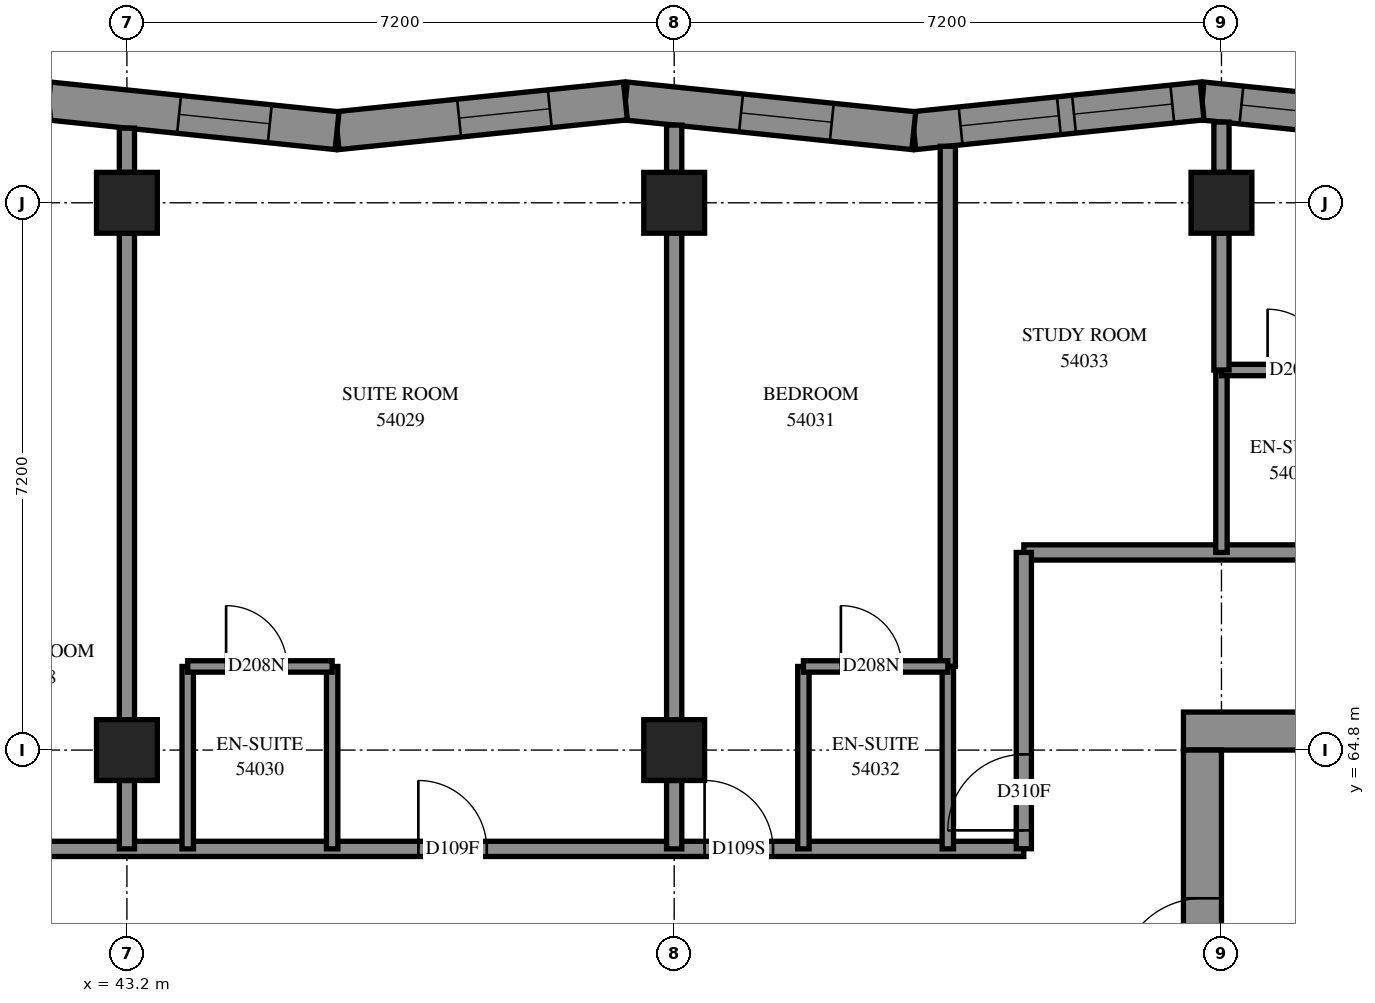
"""IFC4 building model, lengths in metres.
Left out: names, types, materials, properties, quantities, classifications, styles, units other than length and angle.
Written with IfcOpenShell. Run it as: python <this file> out.ifc"""

import sys

from ifc_helpers import new_model, si_unit, direction, frame, frame_2d, origin, origin_2d, place, context, subcontext, project, spatial, polyline, rectangle, outline, extrude, element, fill, save


model = new_model("IFC4")
c1 = context("Model", 3, precision=1e-05, world=origin(), true_north=direction((0.0, 1.0)))
c2 = subcontext(c1, "Body", "Model", "MODEL_VIEW")
j1 = project(units=[si_unit("LENGTHUNIT", "METRE"), si_unit("PLANEANGLEUNIT", "RADIAN")], contexts=[c1])
p1 = place(None, origin())
s1 = spatial("IfcSite", under=j1, at=p1, CompositionType="ELEMENT")
p2 = place(p1, origin())
s2 = spatial("IfcBuilding", under=s1, at=p2, CompositionType="ELEMENT")
p3 = place(p2, frame((0.0, 0.0, 199.8)))
s3 = spatial("IfcBuildingStorey", under=s2, at=p3, CompositionType="ELEMENT", Elevation=199.8)
for number, where, z_axis, x_axis in (
    (1, (43.2, 64.8, 0.0), (0.0, 0.0, 1.0), (1.0, 0.0, 0.0)),
    (2, (43.2, 72.0, 0.0), (0.0, 0.0, 1.0), (1.0, 0.0, 0.0)),
    (3, (50.4, 64.8, 0.0), (0.0, 0.0, 1.0), (1.0, 0.0, 0.0)),
    (4, (50.4, 72.0, 0.0), (0.0, 0.0, 1.0), (1.0, 0.0, 0.0)),
    (5, (57.6, 72.0, 0.0), (0.0, 0.0, 1.0), (1.0, 0.0, 0.0)),
):
    element("IfcColumn", number, at=place(p3, frame(where, z_axis=z_axis, x_axis=x_axis)), inside=s3, PredefinedType="COLUMN", context=c2, shape_type="SweptSolid", body=[
        extrude(rectangle(XDim=0.8, YDim=0.8, at=origin_2d()), origin(), (0.0, 0.0, 1.0), 3.1),
    ])
p4 = place(p3, frame((57.1, 65.05, -0.3), z_axis=(0.0, 0.0, 1.0), x_axis=(1.0, 0.0, 0.0)))
e6 = element("IfcWall", 6, at=p4, inside=s3, PredefinedType="SHEAR", context=c2, shape_type="SweptSolid", body=[
    extrude(rectangle(XDim=15.4, YDim=0.5, at=frame_2d((7.7, 0.0))), origin(), (0.0, 0.0, 1.0), 2.7),
])
p5 = place(p4, frame((10.5, 0.0, 0.3)))
e7 = element("IfcOpeningElement", 7, at=p5, cuts=e6, PredefinedType="OPENING", context=c2, shape_type="SweptSolid", body=[
    extrude(rectangle(XDim=0.8, YDim=2.1, at=frame_2d((0.4, 1.05))), frame((0.0, 0.26, 0.0), z_axis=(0.0, -1.0, 0.0), x_axis=(1.0, 0.0, 0.0)), (0.0, 0.0, 1.0), 0.52),
])
p6 = place(p3, frame((57.35, 50.4, -0.3), z_axis=(0.0, 0.0, 1.0), x_axis=(0.0, 1.0, 0.0)))
e8 = element("IfcWall", 8, at=p6, inside=s3, PredefinedType="SHEAR", context=c2, shape_type="SweptSolid", body=[
    extrude(rectangle(XDim=14.4, YDim=0.5, at=frame_2d((7.2, 0.0))), origin(), (0.0, 0.0, 1.0), 2.7),
])
p7 = place(p6, frame((4.55, 0.0, 0.3)))
e9 = element("IfcOpeningElement", 9, at=p7, cuts=e8, PredefinedType="OPENING", context=c2, shape_type="SweptSolid", body=[
    extrude(rectangle(XDim=1.1, YDim=2.1, at=frame_2d((0.55, 1.05))), frame((0.0, 0.26, 0.0), z_axis=(0.0, -1.0, 0.0), x_axis=(1.0, 0.0, 0.0)), (0.0, 0.0, 1.0), 0.52),
])
p8 = place(p6, frame((11.35, 0.0, 0.3)))
e10 = element("IfcOpeningElement", 10, at=p8, cuts=e8, PredefinedType="OPENING", context=c2, shape_type="SweptSolid", body=[
    extrude(rectangle(XDim=1.1, YDim=2.1, at=frame_2d((0.55, 1.05))), frame((0.0, 0.26, 0.0), z_axis=(0.0, -1.0, 0.0), x_axis=(1.0, 0.0, 0.0)), (0.0, 0.0, 1.0), 0.52),
])
p9 = place(p3, frame((61.139, 72.949, 0.0), z_axis=(0.0, 0.0, 1.0), x_axis=(-0.9947306832, 0.1025225234, 0.0)))
e11 = element("IfcWall", 11, at=p9, inside=s3, PredefinedType="SOLIDWALL", context=c2, shape_type="SweptSolid", body=[
    extrude(outline(polyline([(0.026, -0.25), (3.84, -0.25), (3.788, 0.25), (-0.026, 0.25), (0.026, -0.25)])), origin(), (0.0, 0.0, 1.0), 3.1),
])
p10 = place(p9, frame((0.494, 0.0, 0.45)))
e12 = element("IfcOpeningElement", 12, at=p10, cuts=e11, PredefinedType="OPENING", context=c2, shape_type="SweptSolid", body=[
    extrude(rectangle(XDim=1.3, YDim=2.5, at=frame_2d((0.65, 1.25))), frame((0.0, 0.26, 0.0), z_axis=(0.0, -1.0, 0.0), x_axis=(1.0, 0.0, 0.0)), (0.0, 0.0, 1.0), 0.52),
])
p11 = place(p9, frame((1.994, 0.0, 0.45)))
e13 = element("IfcOpeningElement", 13, at=p11, cuts=e11, PredefinedType="OPENING", context=c2, shape_type="SweptSolid", body=[
    extrude(rectangle(XDim=1.3, YDim=2.5, at=frame_2d((0.65, 1.25))), frame((0.0, 0.26, 0.0), z_axis=(0.0, -1.0, 0.0), x_axis=(1.0, 0.0, 0.0)), (0.0, 0.0, 1.0), 0.52),
])
p12 = place(p3, frame((57.346, 73.34, 0.0), z_axis=(0.0, 0.0, 1.0), x_axis=(-0.9947304076, -0.1025251975, 0.0)))
e14 = element("IfcWall", 14, at=p12, inside=s3, PredefinedType="SOLIDWALL", context=c2, shape_type="SweptSolid", body=[
    extrude(outline(polyline([(-0.026, -0.25), (3.788, -0.25), (3.84, 0.25), (0.026, 0.25), (-0.026, -0.25)])), origin(), (0.0, 0.0, 1.0), 3.1),
])
p13 = place(p12, frame((0.395, 0.0, 0.45)))
e15 = element("IfcOpeningElement", 15, at=p13, cuts=e14, PredefinedType="OPENING", context=c2, shape_type="SweptSolid", body=[
    extrude(rectangle(XDim=1.3, YDim=2.5, at=frame_2d((0.65, 1.25))), frame((0.0, 0.26, 0.0), z_axis=(0.0, -1.0, 0.0), x_axis=(1.0, 0.0, 0.0)), (0.0, 0.0, 1.0), 0.52),
])
p14 = place(p12, frame((1.895, 0.0, 0.45)))
e16 = element("IfcOpeningElement", 16, at=p14, cuts=e14, PredefinedType="OPENING", context=c2, shape_type="SweptSolid", body=[
    extrude(rectangle(XDim=1.3, YDim=2.5, at=frame_2d((0.65, 1.25))), frame((0.0, 0.26, 0.0), z_axis=(0.0, -1.0, 0.0), x_axis=(1.0, 0.0, 0.0)), (0.0, 0.0, 1.0), 0.52),
])
p15 = place(p3, frame((53.552, 72.949, 0.0), z_axis=(0.0, 0.0, 1.0), x_axis=(-0.9947306832, 0.1025225234, 0.0)))
e17 = element("IfcWall", 17, at=p15, inside=s3, PredefinedType="SOLIDWALL", context=c2, shape_type="SweptSolid", body=[
    extrude(outline(polyline([(0.026, -0.25), (3.84, -0.25), (3.788, 0.25), (-0.026, 0.25), (0.026, -0.25)])), origin(), (0.0, 0.0, 1.0), 3.1),
])
p16 = place(p15, frame((1.084, 0.0, 0.45)))
e18 = element("IfcOpeningElement", 18, at=p16, cuts=e17, PredefinedType="OPENING", context=c2, shape_type="SweptSolid", body=[
    extrude(rectangle(XDim=1.2, YDim=2.5, at=frame_2d((0.6, 1.25))), frame((0.0, 0.26, 0.0), z_axis=(0.0, -1.0, 0.0), x_axis=(1.0, 0.0, 0.0)), (0.0, 0.0, 1.0), 0.52),
])
p17 = place(p3, frame((49.758, 73.34, 0.0), z_axis=(0.0, 0.0, 1.0), x_axis=(-0.9947306832, -0.1025225234, 0.0)))
e19 = element("IfcWall", 19, at=p17, inside=s3, PredefinedType="SOLIDWALL", context=c2, shape_type="SweptSolid", body=[
    extrude(outline(polyline([(-0.026, -0.25), (3.788, -0.25), (3.84, 0.25), (0.026, 0.25), (-0.026, -0.25)])), origin(), (0.0, 0.0, 1.0), 3.1),
])
p18 = place(p17, frame((1.0, 0.0, 0.45)))
e20 = element("IfcOpeningElement", 20, at=p18, cuts=e19, PredefinedType="OPENING", context=c2, shape_type="SweptSolid", body=[
    extrude(rectangle(XDim=1.2, YDim=2.5, at=frame_2d((0.6, 1.25))), frame((0.0, 0.26, 0.0), z_axis=(0.0, -1.0, 0.0), x_axis=(1.0, 0.0, 0.0)), (0.0, 0.0, 1.0), 0.52),
])
p19 = place(p3, frame((45.965, 72.949, 0.0), z_axis=(0.0, 0.0, 1.0), x_axis=(-0.9947304076, 0.1025251975, 0.0)))
e21 = element("IfcWall", 21, at=p19, inside=s3, PredefinedType="SOLIDWALL", context=c2, shape_type="SweptSolid", body=[
    extrude(outline(polyline([(0.026, -0.25), (3.84, -0.25), (3.788, 0.25), (-0.026, 0.25), (0.026, -0.25)])), origin(), (0.0, 0.0, 1.0), 3.1),
])
p20 = place(p19, frame((0.89, 0.0, 0.45)))
e22 = element("IfcOpeningElement", 22, at=p20, cuts=e21, PredefinedType="OPENING", context=c2, shape_type="SweptSolid", body=[
    extrude(rectangle(XDim=1.2, YDim=2.5, at=frame_2d((0.6, 1.25))), frame((0.0, 0.26, 0.0), z_axis=(0.0, -1.0, 0.0), x_axis=(1.0, 0.0, 0.0)), (0.0, 0.0, 1.0), 0.52),
])
p21 = place(p3, frame((55.0, 67.4, 0.0), z_axis=(0.0, 0.0, 1.0), x_axis=(1.0, 0.0, 0.0)))
e23 = element("IfcWall", 23, at=p21, inside=s3, PredefinedType="PARTITIONING", context=c2, shape_type="SweptSolid", body=[
    extrude(rectangle(XDim=19.6, YDim=0.2, at=frame_2d((9.8, 0.0))), origin(), (0.0, 0.0, 1.0), 3.1),
])
p22 = place(p21, frame((6.499, 0.0, 0.0)))
e24 = element("IfcOpeningElement", 24, at=p22, cuts=e23, PredefinedType="OPENING", context=c2, shape_type="SweptSolid", body=[
    extrude(rectangle(XDim=0.9, YDim=2.1, at=frame_2d((0.45, 1.05))), frame((0.0, 0.11, 0.0), z_axis=(0.0, -1.0, 0.0), x_axis=(1.0, 0.0, 0.0)), (0.0, 0.0, 1.0), 0.22),
])
p23 = place(p21, frame((14.001, 0.0, 0.0)))
e25 = element("IfcOpeningElement", 25, at=p23, cuts=e23, PredefinedType="OPENING", context=c2, shape_type="SweptSolid", body=[
    extrude(rectangle(XDim=0.9, YDim=2.1, at=frame_2d((0.45, 1.05))), frame((0.0, 0.11, 0.0), z_axis=(0.0, -1.0, 0.0), x_axis=(1.0, 0.0, 0.0)), (0.0, 0.0, 1.0), 0.22),
])
p24 = place(p3, frame((40.702, 63.5, 0.0), z_axis=(0.0, 0.0, 1.0), x_axis=(1.0, 0.0, 0.0)))
e26 = element("IfcWall", 26, at=p24, inside=s3, PredefinedType="PARTITIONING", context=c2, shape_type="SweptSolid", body=[
    extrude(rectangle(XDim=14.298, YDim=0.2, at=frame_2d((7.149, 0.0))), origin(), (0.0, 0.0, 1.0), 3.1),
])
p25 = place(p24, frame((6.332, 0.0, 0.0)))
e27 = element("IfcOpeningElement", 27, at=p25, cuts=e26, PredefinedType="OPENING", context=c2, shape_type="SweptSolid", body=[
    extrude(rectangle(XDim=0.9, YDim=2.1, at=frame_2d((0.45, 1.05))), frame((0.0, 0.11, 0.0), z_axis=(0.0, -1.0, 0.0), x_axis=(1.0, 0.0, 0.0)), (0.0, 0.0, 1.0), 0.22),
])
p26 = place(p24, frame((10.098, 0.0, 0.0)))
e28 = element("IfcOpeningElement", 28, at=p26, cuts=e26, PredefinedType="OPENING", context=c2, shape_type="SweptSolid", body=[
    extrude(rectangle(XDim=0.9, YDim=2.1, at=frame_2d((0.45, 1.05))), frame((0.0, 0.11, 0.0), z_axis=(0.0, -1.0, 0.0), x_axis=(1.0, 0.0, 0.0)), (0.0, 0.0, 1.0), 0.22),
])
p27 = place(p3, frame((54.0, 65.9, 0.0), z_axis=(0.0, 0.0, 1.0), x_axis=(0.0, 1.0, 0.0)))
e29 = element("IfcWall", 29, at=p27, inside=s3, PredefinedType="PARTITIONING", context=c2, shape_type="SweptSolid", body=[
    extrude(rectangle(XDim=6.843, YDim=0.2, at=frame_2d((3.422, 0.0))), origin(), (0.0, 0.0, 1.0), 3.1),
])
for number, where, z_axis, x_axis in (
    (30, (43.2, 65.2, 0.0), (0.0, 0.0, 1.0), (0.0, 1.0, 0.0)),
    (31, (50.4, 65.2, 0.0), (0.0, 0.0, 1.0), (0.0, 1.0, 0.0)),
):
    element("IfcWall", number, at=place(p3, frame(where, z_axis=z_axis, x_axis=x_axis)), inside=s3, PredefinedType="PARTITIONING", context=c2, shape_type="SweptSolid", body=[
        extrude(rectangle(XDim=6.4, YDim=0.2, at=frame_2d((3.2, 0.0))), origin(), (0.0, 0.0, 1.0), 3.1),
    ])
p28 = place(p3, frame((55.0, 63.502, 0.0), z_axis=(0.0, 0.0, 1.0), x_axis=(0.0, 1.0, 0.0)))
e32 = element("IfcWall", 32, at=p28, inside=s3, PredefinedType="PARTITIONING", context=c2, shape_type="SweptSolid", body=[
    extrude(rectangle(XDim=3.898, YDim=0.2, at=frame_2d((1.949, 0.0))), origin(), (0.0, 0.0, 1.0), 3.1),
])
p29 = place(p28, frame((0.242, 0.0, 0.0)))
e33 = element("IfcOpeningElement", 33, at=p29, cuts=e32, PredefinedType="OPENING", context=c2, shape_type="SweptSolid", body=[
    extrude(rectangle(XDim=1.0, YDim=2.1, at=frame_2d((0.5, 1.05))), frame((0.0, 0.11, 0.0), z_axis=(0.0, -1.0, 0.0), x_axis=(1.0, 0.0, 0.0)), (0.0, 0.0, 1.0), 0.22),
])
for number, where, z_axis, x_axis in (
    (34, (44.0, 63.5, 0.0), (0.0, 0.0, 1.0), (0.0, 1.0, 0.0)),
    (35, (45.9, 63.5, 0.0), (0.0, 0.0, 1.0), (0.0, 1.0, 0.0)),
    (36, (52.1, 63.5, 0.0), (0.0, 0.0, 1.0), (0.0, 1.0, 0.0)),
    (37, (54.0, 63.5, 0.0), (0.0, 0.0, 1.0), (0.0, 1.0, 0.0)),
    (38, (57.6, 67.4, 0.0), (0.0, 0.0, 1.0), (0.0, 1.0, 0.0)),
):
    element("IfcWall", number, at=place(p3, frame(where, z_axis=z_axis, x_axis=x_axis)), inside=s3, PredefinedType="PARTITIONING", context=c2, shape_type="SweptSolid", body=[
        extrude(rectangle(XDim=2.4, YDim=0.15, at=frame_2d((1.2, 0.0))), origin(), (0.0, 0.0, 1.0), 3.1),
    ])
p30 = place(p3, frame((44.0, 65.9, 0.0), z_axis=(0.0, 0.0, 1.0), x_axis=(1.0, 0.0, 0.0)))
e39 = element("IfcWall", 39, at=p30, inside=s3, PredefinedType="PARTITIONING", context=c2, shape_type="SweptSolid", body=[
    extrude(rectangle(XDim=1.9, YDim=0.15, at=frame_2d((0.95, 0.0))), origin(), (0.0, 0.0, 1.0), 3.1),
])
p31 = place(p30, frame((0.505, 0.0, 0.0)))
e40 = element("IfcOpeningElement", 40, at=p31, cuts=e39, PredefinedType="OPENING", context=c2, shape_type="SweptSolid", body=[
    extrude(rectangle(XDim=0.8, YDim=2.1, at=frame_2d((0.4, 1.05))), frame((0.0, 0.085, 0.0), z_axis=(0.0, -1.0, 0.0), x_axis=(1.0, 0.0, 0.0)), (0.0, 0.0, 1.0), 0.17),
])
p32 = place(p3, frame((52.1, 65.9, 0.0), z_axis=(0.0, 0.0, 1.0), x_axis=(1.0, 0.0, 0.0)))
e41 = element("IfcWall", 41, at=p32, inside=s3, PredefinedType="PARTITIONING", context=c2, shape_type="SweptSolid", body=[
    extrude(rectangle(XDim=1.9, YDim=0.15, at=frame_2d((0.95, 0.0))), origin(), (0.0, 0.0, 1.0), 3.1),
])
p33 = place(p32, frame((0.493, 0.0, 0.0)))
e42 = element("IfcOpeningElement", 42, at=p33, cuts=e41, PredefinedType="OPENING", context=c2, shape_type="SweptSolid", body=[
    extrude(rectangle(XDim=0.8, YDim=2.1, at=frame_2d((0.4, 1.05))), frame((0.0, 0.085, 0.0), z_axis=(0.0, -1.0, 0.0), x_axis=(1.0, 0.0, 0.0)), (0.0, 0.0, 1.0), 0.17),
])
p34 = place(p3, frame((57.6, 69.8, 0.0), z_axis=(0.0, 0.0, 1.0), x_axis=(1.0, 0.0, 0.0)))
e43 = element("IfcWall", 43, at=p34, inside=s3, PredefinedType="PARTITIONING", context=c2, shape_type="SweptSolid", body=[
    extrude(rectangle(XDim=1.9, YDim=0.15, at=frame_2d((0.95, 0.0))), origin(), (0.0, 0.0, 1.0), 3.1),
])
p35 = place(p34, frame((0.607, 0.0, 0.0)))
e44 = element("IfcOpeningElement", 44, at=p35, cuts=e43, PredefinedType="OPENING", context=c2, shape_type="SweptSolid", body=[
    extrude(rectangle(XDim=0.8, YDim=2.1, at=frame_2d((0.4, 1.05))), frame((0.0, 0.085, 0.0), z_axis=(0.0, -1.0, 0.0), x_axis=(1.0, 0.0, 0.0)), (0.0, 0.0, 1.0), 0.17),
])
p36 = place(p3, frame((57.6, 69.8, 0.0), z_axis=(0.0, 0.0, 1.0), x_axis=(0.0, 1.0, 0.0)))
e45 = element("IfcWall", 45, at=p36, inside=s3, PredefinedType="PARTITIONING", context=c2, shape_type="SweptSolid", body=[
    extrude(rectangle(XDim=1.8, YDim=0.2, at=frame_2d((0.9, 0.0))), origin(), (0.0, 0.0, 1.0), 3.1),
])
for number, where, z_axis, x_axis in (
    (46, (43.2, 63.5, 0.0), (0.0, 0.0, 1.0), (0.0, 1.0, 0.0)),
    (47, (50.4, 63.5, 0.0), (0.0, 0.0, 1.0), (0.0, 1.0, 0.0)),
):
    element("IfcWall", number, at=place(p3, frame(where, z_axis=z_axis, x_axis=x_axis)), inside=s3, PredefinedType="PARTITIONING", context=c2, shape_type="SweptSolid", body=[
        extrude(rectangle(XDim=0.9, YDim=0.2, at=frame_2d((0.45, 0.0))), origin(), (0.0, 0.0, 1.0), 3.1),
    ])
p37 = place(p3, frame((57.6, 72.4, 0.0), z_axis=(0.0, 0.0, 1.0), x_axis=(0.0, 1.0, 0.0)))
e48 = element("IfcWall", 48, at=p37, inside=s3, PredefinedType="PARTITIONING", context=c2, shape_type="SweptSolid", body=[
    extrude(rectangle(XDim=0.662, YDim=0.2, at=frame_2d((0.331, 0.0))), origin(), (0.0, 0.0, 1.0), 3.1),
])
p38 = place(p3, frame((50.4, 72.4, 0.0), z_axis=(0.0, 0.0, 1.0), x_axis=(0.0, 1.0, 0.0)))
e49 = element("IfcWall", 49, at=p38, inside=s3, PredefinedType="PARTITIONING", context=c2, shape_type="SweptSolid", body=[
    extrude(rectangle(XDim=0.622, YDim=0.2, at=frame_2d((0.311, 0.0))), origin(), (0.0, 0.0, 1.0), 3.1),
])
p39 = place(p3, frame((43.2, 72.4, 0.0), z_axis=(0.0, 0.0, 1.0), x_axis=(0.0, 1.0, 0.0)))
e50 = element("IfcWall", 50, at=p39, inside=s3, PredefinedType="PARTITIONING", context=c2, shape_type="SweptSolid", body=[
    extrude(rectangle(XDim=0.582, YDim=0.2, at=frame_2d((0.291, 0.0))), origin(), (0.0, 0.0, 1.0), 3.1),
])
p40 = place(p11, origin())
e51 = element("IfcWindow", 51, at=p40, inside=s3, PartitioningType="SINGLE_PANEL", PredefinedType="WINDOW", context=c2, shape_type="SweptSolid", body=[
    extrude(rectangle(XDim=1.3, YDim=2.5, at=frame_2d((0.65, 1.25))), frame((0.0, 0.18, 0.0), z_axis=(0.0, -1.0, 0.0), x_axis=(1.0, 0.0, 0.0)), (0.0, 0.0, 1.0), 0.06),
])
fill(e13, e51)
p41 = place(p13, origin())
e52 = element("IfcWindow", 52, at=p41, inside=s3, PartitioningType="SINGLE_PANEL", PredefinedType="WINDOW", context=c2, shape_type="SweptSolid", body=[
    extrude(rectangle(XDim=1.3, YDim=2.5, at=frame_2d((0.65, 1.25))), frame((0.0, 0.18, 0.0), z_axis=(0.0, -1.0, 0.0), x_axis=(1.0, 0.0, 0.0)), (0.0, 0.0, 1.0), 0.06),
])
fill(e15, e52)
p42 = place(p14, origin())
e53 = element("IfcWindow", 53, at=p42, inside=s3, PartitioningType="SINGLE_PANEL", PredefinedType="WINDOW", context=c2, shape_type="SweptSolid", body=[
    extrude(rectangle(XDim=1.3, YDim=2.5, at=frame_2d((0.65, 1.25))), frame((0.0, 0.18, 0.0), z_axis=(0.0, -1.0, 0.0), x_axis=(1.0, 0.0, 0.0)), (0.0, 0.0, 1.0), 0.06),
])
fill(e16, e53)
p43 = place(p16, origin())
e54 = element("IfcWindow", 54, at=p43, inside=s3, PartitioningType="SINGLE_PANEL", PredefinedType="WINDOW", context=c2, shape_type="SweptSolid", body=[
    extrude(rectangle(XDim=1.2, YDim=2.5, at=frame_2d((0.6, 1.25))), frame((0.0, 0.18, 0.0), z_axis=(0.0, -1.0, 0.0), x_axis=(1.0, 0.0, 0.0)), (0.0, 0.0, 1.0), 0.06),
])
fill(e18, e54)
p44 = place(p18, origin())
e55 = element("IfcWindow", 55, at=p44, inside=s3, PartitioningType="SINGLE_PANEL", PredefinedType="WINDOW", context=c2, shape_type="SweptSolid", body=[
    extrude(rectangle(XDim=1.2, YDim=2.5, at=frame_2d((0.6, 1.25))), frame((0.0, 0.18, 0.0), z_axis=(0.0, -1.0, 0.0), x_axis=(1.0, 0.0, 0.0)), (0.0, 0.0, 1.0), 0.06),
])
fill(e20, e55)
p45 = place(p20, origin())
e56 = element("IfcWindow", 56, at=p45, inside=s3, PartitioningType="SINGLE_PANEL", PredefinedType="WINDOW", context=c2, shape_type="SweptSolid", body=[
    extrude(rectangle(XDim=1.2, YDim=2.5, at=frame_2d((0.6, 1.25))), frame((0.0, 0.18, 0.0), z_axis=(0.0, -1.0, 0.0), x_axis=(1.0, 0.0, 0.0)), (0.0, 0.0, 1.0), 0.06),
])
fill(e22, e56)
p46 = place(p8, origin())
e57 = element("IfcDoor", 57, at=p46, inside=s3, OperationType="SINGLE_SWING_LEFT", PredefinedType="DOOR", context=c2, shape_type="SweptSolid", body=[
    extrude(rectangle(XDim=1.1, YDim=2.1, at=frame_2d((0.55, 1.05))), frame((0.0, 0.025, 0.0), z_axis=(0.0, -1.0, 0.0), x_axis=(1.0, 0.0, 0.0)), (0.0, 0.0, 1.0), 0.05),
])
fill(e10, e57)
p47 = place(p25, origin())
e58 = element("IfcDoor", 58, at=p47, inside=s3, OperationType="SINGLE_SWING_RIGHT", PredefinedType="DOOR", context=c2, shape_type="SweptSolid", body=[
    extrude(rectangle(XDim=0.9, YDim=2.1, at=frame_2d((0.45, 1.05))), frame((0.0, 0.025, 0.0), z_axis=(0.0, -1.0, 0.0), x_axis=(1.0, 0.0, 0.0)), (0.0, 0.0, 1.0), 0.05),
])
fill(e27, e58)
p48 = place(p31, origin())
e59 = element("IfcDoor", 59, at=p48, inside=s3, OperationType="SINGLE_SWING_RIGHT", PredefinedType="DOOR", context=c2, shape_type="SweptSolid", body=[
    extrude(rectangle(XDim=0.8, YDim=2.1, at=frame_2d((0.4, 1.05))), frame((0.0, 0.025, 0.0), z_axis=(0.0, -1.0, 0.0), x_axis=(1.0, 0.0, 0.0)), (0.0, 0.0, 1.0), 0.05),
])
fill(e40, e59)
p49 = place(p26, origin())
e60 = element("IfcDoor", 60, at=p49, inside=s3, OperationType="SINGLE_SWING_RIGHT", PredefinedType="DOOR", context=c2, shape_type="SweptSolid", body=[
    extrude(rectangle(XDim=0.9, YDim=2.1, at=frame_2d((0.45, 1.05))), frame((0.0, 0.025, 0.0), z_axis=(0.0, -1.0, 0.0), x_axis=(1.0, 0.0, 0.0)), (0.0, 0.0, 1.0), 0.05),
])
fill(e28, e60)
p50 = place(p33, origin())
e61 = element("IfcDoor", 61, at=p50, inside=s3, OperationType="SINGLE_SWING_RIGHT", PredefinedType="DOOR", context=c2, shape_type="SweptSolid", body=[
    extrude(rectangle(XDim=0.8, YDim=2.1, at=frame_2d((0.4, 1.05))), frame((0.0, 0.025, 0.0), z_axis=(0.0, -1.0, 0.0), x_axis=(1.0, 0.0, 0.0)), (0.0, 0.0, 1.0), 0.05),
])
fill(e42, e61)
p51 = place(p29, origin())
e62 = element("IfcDoor", 62, at=p51, inside=s3, OperationType="SINGLE_SWING_LEFT", PredefinedType="DOOR", context=c2, shape_type="SweptSolid", body=[
    extrude(rectangle(XDim=1.0, YDim=2.1, at=frame_2d((0.5, 1.05))), frame((0.0, 0.025, 0.0), z_axis=(0.0, -1.0, 0.0), x_axis=(1.0, 0.0, 0.0)), (0.0, 0.0, 1.0), 0.05),
])
fill(e33, e62)
p52 = place(p35, origin())
e63 = element("IfcDoor", 63, at=p52, inside=s3, OperationType="SINGLE_SWING_RIGHT", PredefinedType="DOOR", context=c2, shape_type="SweptSolid", body=[
    extrude(rectangle(XDim=0.8, YDim=2.1, at=frame_2d((0.4, 1.05))), frame((0.0, 0.025, 0.0), z_axis=(0.0, -1.0, 0.0), x_axis=(1.0, 0.0, 0.0)), (0.0, 0.0, 1.0), 0.05),
])
fill(e44, e63)
save(model, sys.argv[1])
